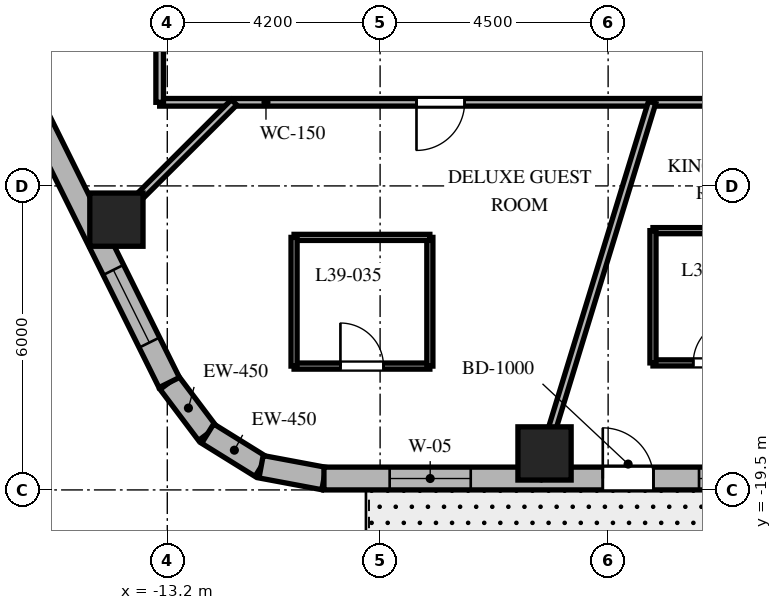
"""IFC4 building model, lengths in metres.
Left out: names, types, materials, properties, quantities, classifications, styles, units other than length and angle.
Written with IfcOpenShell. Run it as: python <this file> out.ifc"""

import sys

from ifc_helpers import new_model, si_unit, direction, frame, frame_2d, origin, origin_2d, place, context, subcontext, project, spatial, rectangle, extrude, element, fill, save


model = new_model("IFC4")
c1 = context("Model", 3, precision=1e-05, world=origin(), true_north=direction((0.0, 1.0)))
c2 = subcontext(c1, "Body", "Model", "MODEL_VIEW")
j1 = project(units=[si_unit("LENGTHUNIT", "METRE"), si_unit("PLANEANGLEUNIT", "RADIAN")], contexts=[c1])
p1 = place(None, origin())
s1 = spatial("IfcSite", under=j1, at=p1, CompositionType="ELEMENT")
p2 = place(p1, origin())
s2 = spatial("IfcBuilding", under=s1, at=p2, CompositionType="ELEMENT")
p3 = place(p2, frame((0.0, 0.0, 159.1)))
s3 = spatial("IfcBuildingStorey", under=s2, at=p3, CompositionType="ELEMENT", Elevation=159.1)
for number, where, z_axis, x_axis in (
    (1, (-5.755, -18.78, 0.0), (0.0, 0.0, 1.0), (1.0, 0.0, 0.0)),
    (2, (-14.204, -14.166, 0.0), (0.0, 0.0, 1.0), (1.0, 0.0, 0.0)),
):
    element("IfcColumn", number, at=place(p3, frame(where, z_axis=z_axis, x_axis=x_axis)), inside=s3, PredefinedType="COLUMN", context=c2, shape_type="SweptSolid", body=[
        extrude(rectangle(XDim=1.05, YDim=1.05, at=origin_2d()), origin(), (0.0, 0.0, 1.0), 3.7),
    ])
p4 = place(p3, frame((-13.162, -17.381, 0.0), z_axis=(0.0, 0.0, 1.0), x_axis=(0.601515770517, -0.798860925205, 0.0)))
e3 = element("IfcWall", 3, at=p4, inside=s3, PredefinedType="SOLIDWALL", context=c2, shape_type="SweptSolid", body=[
    extrude(rectangle(XDim=1.262, YDim=0.45, at=frame_2d((0.631, 0.0))), origin(), (0.0, 0.0, 1.0), 3.4),
])
p5 = place(p3, frame((-12.403, -18.389, 0.0), z_axis=(0.0, 0.0, 1.0), x_axis=(0.849795170926, -0.527113049991, 0.0)))
e4 = element("IfcWall", 4, at=p5, inside=s3, PredefinedType="SOLIDWALL", context=c2, shape_type="SweptSolid", body=[
    extrude(rectangle(XDim=1.241, YDim=0.45, at=frame_2d((0.62, 0.0))), origin(), (0.0, 0.0, 1.0), 3.4),
])
p6 = place(p3, frame((-11.349, -19.043, 0.0), z_axis=(0.0, 0.0, 1.0), x_axis=(0.982931267051, -0.183973161772, 0.0)))
e5 = element("IfcWall", 5, at=p6, inside=s3, PredefinedType="SOLIDWALL", context=c2, shape_type="SweptSolid", body=[
    extrude(rectangle(XDim=1.262, YDim=0.45, at=frame_2d((0.631, 0.0))), origin(), (0.0, 0.0, 1.0), 3.4),
])
p7 = place(p3, frame((-10.108, -19.275, 0.0), z_axis=(0.0, 0.0, 1.0), x_axis=(1.0, 0.0, 0.0)))
e6 = element("IfcWall", 6, at=p7, inside=s3, PredefinedType="SOLIDWALL", context=c2, shape_type="SweptSolid", body=[
    extrude(rectangle(XDim=21.829, YDim=0.45, at=frame_2d((10.915, 0.0))), origin(), (0.0, 0.0, 1.0), 3.4),
])
p8 = place(p7, frame((5.503, 0.0, 0.0)))
e7 = element("IfcOpeningElement", 7, at=p8, cuts=e6, PredefinedType="OPENING", context=c2, shape_type="SweptSolid", body=[
    extrude(rectangle(XDim=1.0, YDim=2.15, at=frame_2d((0.5, 1.075))), frame((0.0, 0.235, 0.0), z_axis=(0.0, -1.0, 0.0), x_axis=(1.0, 0.0, 0.0)), (0.0, 0.0, 1.0), 0.47),
])
p9 = place(p7, frame((1.297, 0.0, 0.8)))
e8 = element("IfcOpeningElement", 8, at=p9, cuts=e6, PredefinedType="OPENING", context=c2, shape_type="SweptSolid", body=[
    extrude(rectangle(XDim=1.6, YDim=1.75, at=frame_2d((0.8, 0.875))), frame((0.0, 0.235, 0.0), z_axis=(0.0, -1.0, 0.0), x_axis=(1.0, 0.0, 0.0)), (0.0, 0.0, 1.0), 0.47),
])
p10 = place(p7, frame((7.402, 0.0, 0.8)))
e9 = element("IfcOpeningElement", 9, at=p10, cuts=e6, PredefinedType="OPENING", context=c2, shape_type="SweptSolid", body=[
    extrude(rectangle(XDim=1.6, YDim=1.75, at=frame_2d((0.8, 0.875))), frame((0.0, 0.235, 0.0), z_axis=(0.0, -1.0, 0.0), x_axis=(1.0, 0.0, 0.0)), (0.0, 0.0, 1.0), 0.47),
])
p11 = place(p7, frame((12.684, 0.0, 0.8)))
e10 = element("IfcOpeningElement", 10, at=p11, cuts=e6, PredefinedType="OPENING", context=c2, shape_type="SweptSolid", body=[
    extrude(rectangle(XDim=1.6, YDim=1.75, at=frame_2d((0.8, 0.875))), frame((0.0, 0.235, 0.0), z_axis=(0.0, -1.0, 0.0), x_axis=(1.0, 0.0, 0.0)), (0.0, 0.0, 1.0), 0.47),
])
p12 = place(p7, frame((18.933, 0.0, 0.8)))
e11 = element("IfcOpeningElement", 11, at=p12, cuts=e6, PredefinedType="OPENING", context=c2, shape_type="SweptSolid", body=[
    extrude(rectangle(XDim=1.6, YDim=1.75, at=frame_2d((0.8, 0.875))), frame((0.0, 0.235, 0.0), z_axis=(0.0, -1.0, 0.0), x_axis=(1.0, 0.0, 0.0)), (0.0, 0.0, 1.0), 0.47),
])
p13 = place(p3, frame((-20.618, -2.344, 0.0), z_axis=(0.0, 0.0, 1.0), x_axis=(0.444243691097, -0.895905990002, 0.0)))
e12 = element("IfcWall", 12, at=p13, inside=s3, PredefinedType="SOLIDWALL", context=c2, shape_type="SweptSolid", body=[
    extrude(rectangle(XDim=16.784, YDim=0.45, at=frame_2d((8.392, 0.0))), origin(), (0.0, 0.0, 1.0), 3.4),
])
p14 = place(p13, frame((0.931, 0.0, 0.8)))
e13 = element("IfcOpeningElement", 13, at=p14, cuts=e12, PredefinedType="OPENING", context=c2, shape_type="SweptSolid", body=[
    extrude(rectangle(XDim=1.6, YDim=1.75, at=frame_2d((0.8, 0.875))), frame((0.0, 0.235, 0.0), z_axis=(0.0, -1.0, 0.0), x_axis=(1.0, 0.0, 0.0)), (0.0, 0.0, 1.0), 0.47),
])
p15 = place(p13, frame((7.642, 0.0, 0.8)))
e14 = element("IfcOpeningElement", 14, at=p15, cuts=e12, PredefinedType="OPENING", context=c2, shape_type="SweptSolid", body=[
    extrude(rectangle(XDim=1.6, YDim=1.75, at=frame_2d((0.8, 0.875))), frame((0.0, 0.235, 0.0), z_axis=(0.0, -1.0, 0.0), x_axis=(1.0, 0.0, 0.0)), (0.0, 0.0, 1.0), 0.47),
])
p16 = place(p13, frame((14.303, 0.0, 0.8)))
e15 = element("IfcOpeningElement", 15, at=p16, cuts=e12, PredefinedType="OPENING", context=c2, shape_type="SweptSolid", body=[
    extrude(rectangle(XDim=1.6, YDim=1.75, at=frame_2d((0.8, 0.875))), frame((0.0, 0.235, 0.0), z_axis=(0.0, -1.0, 0.0), x_axis=(1.0, 0.0, 0.0)), (0.0, 0.0, 1.0), 0.47),
])
p17 = place(p3, frame((13.35, -11.85, 0.0), z_axis=(0.0, 0.0, 1.0), x_axis=(-1.0, 0.0, 0.0)))
e16 = element("IfcWall", 16, at=p17, inside=s3, PredefinedType="PARTITIONING", context=c2, shape_type="SweptSolid", body=[
    extrude(rectangle(XDim=26.7, YDim=0.15, at=frame_2d((13.35, 0.0))), origin(), (0.0, 0.0, 1.0), 2.84),
])
p18 = place(p17, frame((20.682, 0.0, 0.0)))
e17 = element("IfcOpeningElement", 17, at=p18, cuts=e16, PredefinedType="OPENING", context=c2, shape_type="SweptSolid", body=[
    extrude(rectangle(XDim=0.95, YDim=2.03, at=frame_2d((0.475, 1.015))), frame((0.0, 0.085, 0.0), z_axis=(0.0, -1.0, 0.0), x_axis=(1.0, 0.0, 0.0)), (0.0, 0.0, 1.0), 0.17),
])
p19 = place(p17, frame((14.708, 0.0, 0.0)))
e18 = element("IfcOpeningElement", 18, at=p19, cuts=e16, PredefinedType="OPENING", context=c2, shape_type="SweptSolid", body=[
    extrude(rectangle(XDim=0.95, YDim=2.03, at=frame_2d((0.475, 1.015))), frame((0.0, 0.085, 0.0), z_axis=(0.0, -1.0, 0.0), x_axis=(1.0, 0.0, 0.0)), (0.0, 0.0, 1.0), 0.17),
])
p20 = place(p17, frame((10.553, 0.0, 0.0)))
e19 = element("IfcOpeningElement", 19, at=p20, cuts=e16, PredefinedType="OPENING", context=c2, shape_type="SweptSolid", body=[
    extrude(rectangle(XDim=0.95, YDim=2.03, at=frame_2d((0.475, 1.015))), frame((0.0, 0.085, 0.0), z_axis=(0.0, -1.0, 0.0), x_axis=(1.0, 0.0, 0.0)), (0.0, 0.0, 1.0), 0.17),
])
p21 = place(p17, frame((6.353, 0.0, 0.0)))
e20 = element("IfcOpeningElement", 20, at=p21, cuts=e16, PredefinedType="OPENING", context=c2, shape_type="SweptSolid", body=[
    extrude(rectangle(XDim=0.9, YDim=2.03, at=frame_2d((0.45, 1.015))), frame((0.0, 0.085, 0.0), z_axis=(0.0, -1.0, 0.0), x_axis=(1.0, 0.0, 0.0)), (0.0, 0.0, 1.0), 0.17),
])
p22 = place(p17, frame((2.15, 0.0, 0.0)))
e21 = element("IfcOpeningElement", 21, at=p22, cuts=e16, PredefinedType="OPENING", context=c2, shape_type="SweptSolid", body=[
    extrude(rectangle(XDim=0.9, YDim=2.03, at=frame_2d((0.45, 1.015))), frame((0.0, 0.085, 0.0), z_axis=(0.0, -1.0, 0.0), x_axis=(1.0, 0.0, 0.0)), (0.0, 0.0, 1.0), 0.17),
])
p23 = place(p3, frame((-13.35, -11.85, 0.0), z_axis=(0.0, 0.0, 1.0), x_axis=(0.0, 1.0, 0.0)))
e22 = element("IfcWall", 22, at=p23, inside=s3, PredefinedType="PARTITIONING", context=c2, shape_type="SweptSolid", body=[
    extrude(rectangle(XDim=23.7, YDim=0.15, at=frame_2d((11.85, 0.0))), origin(), (0.0, 0.0, 1.0), 2.84),
])
p24 = place(p23, frame((20.136, 0.0, 0.0)))
e23 = element("IfcOpeningElement", 23, at=p24, cuts=e22, PredefinedType="OPENING", context=c2, shape_type="SweptSolid", body=[
    extrude(rectangle(XDim=0.9, YDim=2.03, at=frame_2d((0.45, 1.015))), frame((0.0, 0.085, 0.0), z_axis=(0.0, -1.0, 0.0), x_axis=(1.0, 0.0, 0.0)), (0.0, 0.0, 1.0), 0.17),
])
p25 = place(p23, frame((15.551, 0.0, 0.0)))
e24 = element("IfcOpeningElement", 24, at=p25, cuts=e22, PredefinedType="OPENING", context=c2, shape_type="SweptSolid", body=[
    extrude(rectangle(XDim=0.9, YDim=2.03, at=frame_2d((0.45, 1.015))), frame((0.0, 0.085, 0.0), z_axis=(0.0, -1.0, 0.0), x_axis=(1.0, 0.0, 0.0)), (0.0, 0.0, 1.0), 0.17),
])
p26 = place(p23, frame((12.494, 0.0, 0.0)))
e25 = element("IfcOpeningElement", 25, at=p26, cuts=e22, PredefinedType="OPENING", context=c2, shape_type="SweptSolid", body=[
    extrude(rectangle(XDim=0.9, YDim=2.03, at=frame_2d((0.45, 1.015))), frame((0.0, 0.085, 0.0), z_axis=(0.0, -1.0, 0.0), x_axis=(1.0, 0.0, 0.0)), (0.0, 0.0, 1.0), 0.17),
])
p27 = place(p23, frame((9.424, 0.0, 0.0)))
e26 = element("IfcOpeningElement", 26, at=p27, cuts=e22, PredefinedType="OPENING", context=c2, shape_type="SweptSolid", body=[
    extrude(rectangle(XDim=0.95, YDim=2.03, at=frame_2d((0.475, 1.015))), frame((0.0, 0.085, 0.0), z_axis=(0.0, -1.0, 0.0), x_axis=(1.0, 0.0, 0.0)), (0.0, 0.0, 1.0), 0.17),
])
p28 = place(p23, frame((3.765, 0.0, 0.0)))
e27 = element("IfcOpeningElement", 27, at=p28, cuts=e22, PredefinedType="OPENING", context=c2, shape_type="SweptSolid", body=[
    extrude(rectangle(XDim=0.9, YDim=2.03, at=frame_2d((0.45, 1.015))), frame((0.0, 0.085, 0.0), z_axis=(0.0, -1.0, 0.0), x_axis=(1.0, 0.0, 0.0)), (0.0, 0.0, 1.0), 0.17),
])
p29 = place(p3, frame((-11.882, -11.85, 0.0), z_axis=(0.0, 0.0, 1.0), x_axis=(-0.708037373639, -0.706174962407, 0.0)))
e28 = element("IfcWall", 28, at=p29, inside=s3, PredefinedType="PARTITIONING", context=c2, shape_type="SweptSolid", body=[
    extrude(rectangle(XDim=3.802, YDim=0.15, at=frame_2d((1.901, 0.0))), origin(), (0.0, 0.0, 1.0), 2.64),
])
p30 = place(p3, frame((-3.631, -11.85, 0.0), z_axis=(0.0, 0.0, 1.0), x_axis=(-0.293007573338, -0.956110120209, 0.0)))
e29 = element("IfcWall", 29, at=p30, inside=s3, PredefinedType="PARTITIONING", context=c2, shape_type="SweptSolid", body=[
    extrude(rectangle(XDim=7.766, YDim=0.15, at=frame_2d((3.883, 0.0))), origin(), (0.0, 0.0, 1.0), 2.64),
])
p31 = place(p3, frame((-10.698, -17.056, 0.0), z_axis=(0.0, 0.0, 1.0), x_axis=(1.0, 0.0, 0.0)))
e30 = element("IfcWall", 30, at=p31, inside=s3, PredefinedType="PARTITIONING", context=c2, shape_type="SweptSolid", body=[
    extrude(rectangle(XDim=2.68, YDim=0.12, at=frame_2d((1.34, 0.0))), origin(), (0.0, 0.0, 1.0), 2.64),
])
p32 = place(p31, frame((0.915, 0.0, 0.0)))
e31 = element("IfcOpeningElement", 31, at=p32, cuts=e30, PredefinedType="OPENING", context=c2, shape_type="SweptSolid", body=[
    extrude(rectangle(XDim=0.85, YDim=2.03, at=frame_2d((0.425, 1.015))), frame((0.0, 0.07, 0.0), z_axis=(0.0, -1.0, 0.0), x_axis=(1.0, 0.0, 0.0)), (0.0, 0.0, 1.0), 0.14),
])
p33 = place(p3, frame((-8.018, -17.056, 0.0), z_axis=(0.0, 0.0, 1.0), x_axis=(0.0, 1.0, 0.0)))
e32 = element("IfcWall", 32, at=p33, inside=s3, PredefinedType="PARTITIONING", context=c2, shape_type="SweptSolid", body=[
    extrude(rectangle(XDim=2.54, YDim=0.12, at=frame_2d((1.27, 0.0))), origin(), (0.0, 0.0, 1.0), 3.4),
])
p34 = place(p3, frame((-8.018, -14.516, 0.0), z_axis=(0.0, 0.0, 1.0), x_axis=(-1.0, 0.0, 0.0)))
e33 = element("IfcWall", 33, at=p34, inside=s3, PredefinedType="PARTITIONING", context=c2, shape_type="SweptSolid", body=[
    extrude(rectangle(XDim=2.68, YDim=0.12, at=frame_2d((1.34, 0.0))), origin(), (0.0, 0.0, 1.0), 3.4),
])
p35 = place(p3, frame((-10.698, -14.516, 0.0), z_axis=(0.0, 0.0, 1.0), x_axis=(0.0, -1.0, 0.0)))
e34 = element("IfcWall", 34, at=p35, inside=s3, PredefinedType="PARTITIONING", context=c2, shape_type="SweptSolid", body=[
    extrude(rectangle(XDim=2.54, YDim=0.12, at=frame_2d((1.27, 0.0))), origin(), (0.0, 0.0, 1.0), 2.64),
])
p36 = place(p3, frame((-3.615, -16.993, 0.0), z_axis=(0.0, 0.0, 1.0), x_axis=(1.0, 0.0, 0.0)))
e35 = element("IfcWall", 35, at=p36, inside=s3, PredefinedType="PARTITIONING", context=c2, shape_type="SweptSolid", body=[
    extrude(rectangle(XDim=2.44, YDim=0.12, at=frame_2d((1.22, 0.0))), origin(), (0.0, 0.0, 1.0), 3.4),
])
p37 = place(p36, frame((0.795, 0.0, 0.0)))
e36 = element("IfcOpeningElement", 36, at=p37, cuts=e35, PredefinedType="OPENING", context=c2, shape_type="SweptSolid", body=[
    extrude(rectangle(XDim=0.85, YDim=2.03, at=frame_2d((0.425, 1.015))), frame((0.0, 0.07, 0.0), z_axis=(0.0, -1.0, 0.0), x_axis=(1.0, 0.0, 0.0)), (0.0, 0.0, 1.0), 0.14),
])
p38 = place(p3, frame((-1.175, -14.383, 0.0), z_axis=(0.0, 0.0, 1.0), x_axis=(-1.0, 0.0, 0.0)))
e37 = element("IfcWall", 37, at=p38, inside=s3, PredefinedType="PARTITIONING", context=c2, shape_type="SweptSolid", body=[
    extrude(rectangle(XDim=2.44, YDim=0.12, at=frame_2d((1.22, 0.0))), origin(), (0.0, 0.0, 1.0), 3.4),
])
p39 = place(p3, frame((-3.615, -14.383, 0.0), z_axis=(0.0, 0.0, 1.0), x_axis=(0.0, -1.0, 0.0)))
e38 = element("IfcWall", 38, at=p39, inside=s3, PredefinedType="PARTITIONING", context=c2, shape_type="SweptSolid", body=[
    extrude(rectangle(XDim=2.61, YDim=0.12, at=frame_2d((1.305, 0.0))), origin(), (0.0, 0.0, 1.0), 2.84),
])
p40 = place(p8, origin())
e39 = element("IfcDoor", 39, at=p40, inside=s3, OperationType="SINGLE_SWING_LEFT", PredefinedType="DOOR", context=c2, shape_type="SweptSolid", body=[
    extrude(rectangle(XDim=1.0, YDim=2.15, at=frame_2d((0.5, 1.075))), frame((0.0, 0.025, 0.0), z_axis=(0.0, -1.0, 0.0), x_axis=(1.0, 0.0, 0.0)), (0.0, 0.0, 1.0), 0.05),
])
fill(e7, e39)
p41 = place(p9, origin())
e40 = element("IfcWindow", 40, at=p41, inside=s3, PartitioningType="SINGLE_PANEL", PredefinedType="WINDOW", context=c2, shape_type="SweptSolid", body=[
    extrude(rectangle(XDim=1.6, YDim=1.75, at=frame_2d((0.8, 0.875))), frame((0.0, 0.03, 0.0), z_axis=(0.0, -1.0, 0.0), x_axis=(1.0, 0.0, 0.0)), (0.0, 0.0, 1.0), 0.06),
])
fill(e8, e40)
p42 = place(p10, origin())
e41 = element("IfcWindow", 41, at=p42, inside=s3, PartitioningType="SINGLE_PANEL", PredefinedType="WINDOW", context=c2, shape_type="SweptSolid", body=[
    extrude(rectangle(XDim=1.6, YDim=1.75, at=frame_2d((0.8, 0.875))), frame((0.0, 0.03, 0.0), z_axis=(0.0, -1.0, 0.0), x_axis=(1.0, 0.0, 0.0)), (0.0, 0.0, 1.0), 0.06),
])
fill(e9, e41)
p43 = place(p16, origin())
e42 = element("IfcWindow", 42, at=p43, inside=s3, PartitioningType="SINGLE_PANEL", PredefinedType="WINDOW", context=c2, shape_type="SweptSolid", body=[
    extrude(rectangle(XDim=1.6, YDim=1.75, at=frame_2d((0.8, 0.875))), frame((0.0, 0.03, 0.0), z_axis=(0.0, -1.0, 0.0), x_axis=(1.0, 0.0, 0.0)), (0.0, 0.0, 1.0), 0.06),
])
fill(e15, e42)
p44 = place(p18, origin())
e43 = element("IfcDoor", 43, at=p44, inside=s3, OperationType="SINGLE_SWING_RIGHT", PredefinedType="DOOR", context=c2, shape_type="SweptSolid", body=[
    extrude(rectangle(XDim=0.95, YDim=2.03, at=frame_2d((0.475, 1.015))), frame((0.0, 0.025, 0.0), z_axis=(0.0, -1.0, 0.0), x_axis=(1.0, 0.0, 0.0)), (0.0, 0.0, 1.0), 0.05),
])
fill(e17, e43)
p45 = place(p32, origin())
e44 = element("IfcDoor", 44, at=p45, inside=s3, OperationType="SINGLE_SWING_LEFT", PredefinedType="DOOR", context=c2, shape_type="SweptSolid", body=[
    extrude(rectangle(XDim=0.85, YDim=2.03, at=frame_2d((0.425, 1.015))), frame((0.0, 0.025, 0.0), z_axis=(0.0, -1.0, 0.0), x_axis=(1.0, 0.0, 0.0)), (0.0, 0.0, 1.0), 0.05),
])
fill(e31, e44)
p46 = place(p37, origin())
e45 = element("IfcDoor", 45, at=p46, inside=s3, OperationType="SINGLE_SWING_RIGHT", PredefinedType="DOOR", context=c2, shape_type="SweptSolid", body=[
    extrude(rectangle(XDim=0.85, YDim=2.03, at=frame_2d((0.425, 1.015))), frame((0.0, 0.025, 0.0), z_axis=(0.0, -1.0, 0.0), x_axis=(1.0, 0.0, 0.0)), (0.0, 0.0, 1.0), 0.05),
])
fill(e36, e45)
save(model, sys.argv[1])
